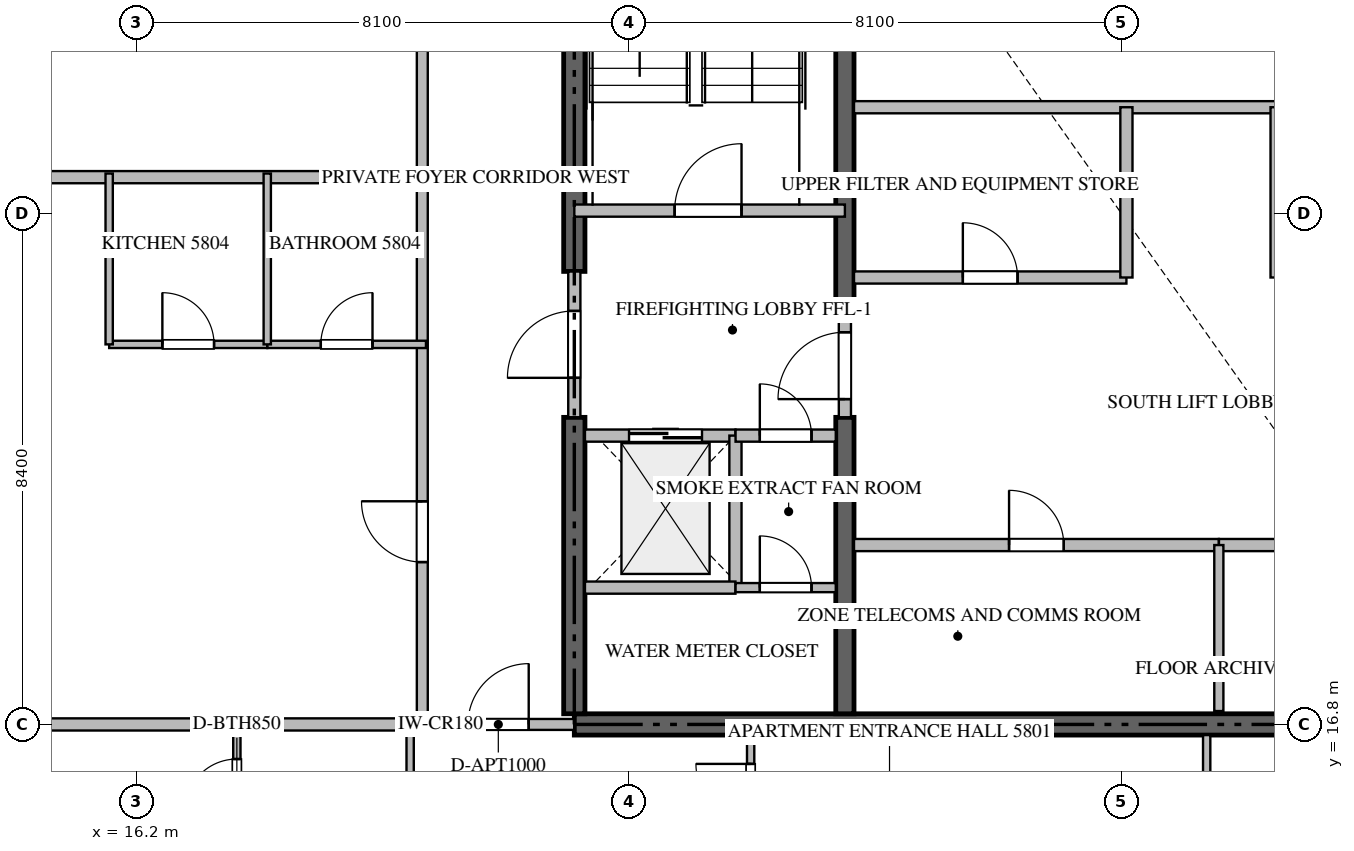
"""IFC4 building model, lengths in metres.
Left out: names, types, materials, properties, quantities, classifications, styles, units other than length and angle.
Written with IfcOpenShell. Run it as: python <this file> out.ifc"""

import sys

from ifc_helpers import new_model, si_unit, direction, frame, frame_2d, origin, place, context, subcontext, project, spatial, rectangle, extrude, source, transform, mapped, element, fill, save


model = new_model("IFC4")
c1 = context("Model", 3, precision=1e-05, world=origin(), true_north=direction((0.0, 1.0)))
c2 = subcontext(c1, "Body", "Model", "MODEL_VIEW")
j1 = project(units=[si_unit("LENGTHUNIT", "METRE"), si_unit("PLANEANGLEUNIT", "RADIAN")], contexts=[c1])
p1 = place(None, origin())
s1 = spatial("IfcSite", under=j1, at=p1, CompositionType="ELEMENT")
p2 = place(p1, origin())
s2 = spatial("IfcBuilding", under=s1, at=p2, CompositionType="ELEMENT")
p3 = place(p2, frame((0.0, 0.0, 233.55)))
s3 = spatial("IfcBuildingStorey", under=s2, at=p3, CompositionType="ELEMENT", Elevation=233.55)
p4 = place(p3, frame((23.4, 16.8, -0.26), z_axis=(0.0, 0.0, 1.0), x_axis=(1.0, 0.0, 0.0)))
e1 = element("IfcWall", 1, at=p4, inside=s3, PredefinedType="SHEAR", context=c2, shape_type="SweptSolid", body=[
    extrude(rectangle(XDim=18.0, YDim=0.35, at=frame_2d((9.0, 0.0))), origin(), (0.0, 0.0, 1.0), 3.848),
])
p5 = place(p3, frame((23.4, 16.975, -0.26), z_axis=(0.0, 0.0, 1.0), x_axis=(0.0, 1.0, 0.0)))
e2 = element("IfcWall", 2, at=p5, inside=s3, PredefinedType="SHEAR", context=c2, shape_type="SweptSolid", body=[
    extrude(rectangle(XDim=4.875, YDim=0.35, at=frame_2d((2.438, 0.0))), origin(), (0.0, 0.0, 1.0), 3.848),
])
p6 = place(p3, frame((23.4, 24.25, -0.26), z_axis=(0.0, 0.0, 1.0), x_axis=(0.0, 1.0, 0.0)))
e3 = element("IfcWall", 3, at=p6, inside=s3, PredefinedType="SHEAR", context=c2, shape_type="SweptSolid", body=[
    extrude(rectangle(XDim=9.175, YDim=0.35, at=frame_2d((4.587, 0.0))), origin(), (0.0, 0.0, 1.0), 3.848),
])
p7 = place(p3, frame((27.85, 16.975, -0.26), z_axis=(0.0, 0.0, 1.0), x_axis=(0.0, 1.0, 0.0)))
e4 = element("IfcWall", 4, at=p7, inside=s3, PredefinedType="SHEAR", context=c2, shape_type="SweptSolid", body=[
    extrude(rectangle(XDim=4.875, YDim=0.3, at=frame_2d((2.438, 0.0))), origin(), (0.0, 0.0, 1.0), 3.848),
])
p8 = place(p3, frame((27.85, 23.55, -0.26), z_axis=(0.0, 0.0, 1.0), x_axis=(0.0, 1.0, 0.0)))
e5 = element("IfcWall", 5, at=p8, inside=s3, PredefinedType="SHEAR", context=c2, shape_type="SweptSolid", body=[
    extrude(rectangle(XDim=9.875, YDim=0.3, at=frame_2d((4.938, 0.0))), origin(), (0.0, 0.0, 1.0), 3.848),
])
p9 = place(p3, frame((23.4, 25.25, 0.0), z_axis=(0.0, 0.0, 1.0), x_axis=(1.0, 0.0, 0.0)))
e6 = element("IfcWall", 6, at=p9, inside=s3, PredefinedType="STANDARD", context=c2, shape_type="SweptSolid", body=[
    extrude(rectangle(XDim=4.45, YDim=0.2, at=frame_2d((2.225, 0.0))), origin(), (0.0, 0.0, 1.0), 3.59),
])
p10 = place(p9, frame((1.65, 0.0, 0.0)))
e7 = element("IfcOpeningElement", 7, at=p10, cuts=e6, PredefinedType="OPENING", context=c2, shape_type="SweptSolid", body=[
    extrude(rectangle(XDim=1.1, YDim=2.15, at=frame_2d((0.55, 1.075))), frame((0.0, 0.11, 0.0), z_axis=(0.0, -1.0, 0.0), x_axis=(1.0, 0.0, 0.0)), (0.0, 0.0, 1.0), 0.22),
])
p11 = place(p3, frame((23.575, 21.55, 0.0), z_axis=(0.0, 0.0, 1.0), x_axis=(1.0, 0.0, 0.0)))
e8 = element("IfcWall", 8, at=p11, inside=s3, PredefinedType="STANDARD", context=c2, shape_type="SweptSolid", body=[
    extrude(rectangle(XDim=2.475, YDim=0.2, at=frame_2d((1.238, 0.0))), origin(), (0.0, 0.0, 1.0), 3.59),
])
p12 = place(p11, frame((0.725, 0.0, 0.0)))
e9 = element("IfcOpeningElement", 9, at=p12, cuts=e8, PredefinedType="OPENING", context=c2, shape_type="SweptSolid", body=[
    extrude(rectangle(XDim=1.2, YDim=2.2, at=frame_2d((0.6, 1.1))), frame((0.0, 0.11, 0.0), z_axis=(0.0, -1.0, 0.0), x_axis=(1.0, 0.0, 0.0)), (0.0, 0.0, 1.0), 0.22),
])
p13 = place(p3, frame((26.05, 19.05, 0.0), z_axis=(0.0, 0.0, 1.0), x_axis=(0.0, 1.0, 0.0)))
e10 = element("IfcWall", 10, at=p13, inside=s3, PredefinedType="STANDARD", context=c2, shape_type="SweptSolid", body=[
    extrude(rectangle(XDim=2.5, YDim=0.2, at=frame_2d((1.25, 0.0))), origin(), (0.0, 0.0, 1.0), 3.59),
])
p14 = place(p3, frame((23.575, 19.05, 0.0), z_axis=(0.0, 0.0, 1.0), x_axis=(1.0, 0.0, 0.0)))
e11 = element("IfcWall", 11, at=p14, inside=s3, PredefinedType="STANDARD", context=c2, shape_type="SweptSolid", body=[
    extrude(rectangle(XDim=2.475, YDim=0.2, at=frame_2d((1.238, 0.0))), origin(), (0.0, 0.0, 1.0), 3.59),
])
p15 = place(p3, frame((26.052, 21.55, 0.0), z_axis=(0.0, 0.0, 1.0), x_axis=(1.0, 0.0, 0.0)))
e12 = element("IfcWall", 12, at=p15, inside=s3, PredefinedType="STANDARD", context=c2, shape_type="SweptSolid", body=[
    extrude(rectangle(XDim=1.648, YDim=0.2, at=frame_2d((0.824, 0.0))), origin(), (0.0, 0.0, 1.0), 3.59),
])
p16 = place(p15, frame((0.399, 0.0, 0.0)))
e13 = element("IfcOpeningElement", 13, at=p16, cuts=e12, PredefinedType="OPENING", context=c2, shape_type="SweptSolid", body=[
    extrude(rectangle(XDim=0.85, YDim=2.1, at=frame_2d((0.425, 1.05))), frame((0.0, 0.11, 0.0), z_axis=(0.0, -1.0, 0.0), x_axis=(1.0, 0.0, 0.0)), (0.0, 0.0, 1.0), 0.22),
])
p17 = place(p3, frame((23.4, 21.852, 0.0), z_axis=(0.0, 0.0, 1.0), x_axis=(0.0, 1.0, 0.0)))
e14 = element("IfcWall", 14, at=p17, inside=s3, PredefinedType="STANDARD", context=c2, shape_type="SweptSolid", body=[
    extrude(rectangle(XDim=2.396, YDim=0.2, at=frame_2d((1.198, 0.0))), origin(), (0.0, 0.0, 1.0), 3.59),
])
p18 = place(p17, frame((0.648, 0.0, 0.0)))
e15 = element("IfcOpeningElement", 15, at=p18, cuts=e14, PredefinedType="OPENING", context=c2, shape_type="SweptSolid", body=[
    extrude(rectangle(XDim=1.1, YDim=2.15, at=frame_2d((0.55, 1.075))), frame((0.0, 0.11, 0.0), z_axis=(0.0, -1.0, 0.0), x_axis=(1.0, 0.0, 0.0)), (0.0, 0.0, 1.0), 0.22),
])
p19 = place(p3, frame((27.85, 21.852, 0.0), z_axis=(0.0, 0.0, 1.0), x_axis=(0.0, 1.0, 0.0)))
e16 = element("IfcWall", 16, at=p19, inside=s3, PredefinedType="STANDARD", context=c2, shape_type="SweptSolid", body=[
    extrude(rectangle(XDim=1.696, YDim=0.2, at=frame_2d((0.848, 0.0))), origin(), (0.0, 0.0, 1.0), 3.59),
])
p20 = place(p19, frame((0.298, 0.0, 0.0)))
e17 = element("IfcOpeningElement", 17, at=p20, cuts=e16, PredefinedType="OPENING", context=c2, shape_type="SweptSolid", body=[
    extrude(rectangle(XDim=1.1, YDim=2.15, at=frame_2d((0.55, 1.075))), frame((0.0, 0.11, 0.0), z_axis=(0.0, -1.0, 0.0), x_axis=(1.0, 0.0, 0.0)), (0.0, 0.0, 1.0), 0.22),
])
p21 = place(p3, frame((26.052, 19.05, 0.0), z_axis=(0.0, 0.0, 1.0), x_axis=(1.0, 0.0, 0.0)))
e18 = element("IfcWall", 18, at=p21, inside=s3, PredefinedType="PARTITIONING", context=c2, shape_type="SweptSolid", body=[
    extrude(rectangle(XDim=1.648, YDim=0.15, at=frame_2d((0.824, 0.0))), origin(), (0.0, 0.0, 1.0), 3.59),
])
p22 = place(p21, frame((0.399, 0.0, 0.0)))
e19 = element("IfcOpeningElement", 19, at=p22, cuts=e18, PredefinedType="OPENING", context=c2, shape_type="SweptSolid", body=[
    extrude(rectangle(XDim=0.85, YDim=2.1, at=frame_2d((0.425, 1.05))), frame((0.0, 0.085, 0.0), z_axis=(0.0, -1.0, 0.0), x_axis=(1.0, 0.0, 0.0)), (0.0, 0.0, 1.0), 0.17),
])
p23 = place(p3, frame((28.0, 19.75, 0.0), z_axis=(0.0, 0.0, 1.0), x_axis=(1.0, 0.0, 0.0)))
e20 = element("IfcWall", 20, at=p23, inside=s3, PredefinedType="STANDARD", context=c2, shape_type="SweptSolid", body=[
    extrude(rectangle(XDim=6.0, YDim=0.2, at=frame_2d((3.0, 0.0))), origin(), (0.0, 0.0, 1.0), 3.59),
])
p24 = place(p23, frame((2.55, 0.0, 0.0)))
e21 = element("IfcOpeningElement", 21, at=p24, cuts=e20, PredefinedType="OPENING", context=c2, shape_type="SweptSolid", body=[
    extrude(rectangle(XDim=0.9, YDim=2.1, at=frame_2d((0.45, 1.05))), frame((0.0, 0.11, 0.0), z_axis=(0.0, -1.0, 0.0), x_axis=(1.0, 0.0, 0.0)), (0.0, 0.0, 1.0), 0.22),
])
p25 = place(p3, frame((34.002, 19.75, 0.0), z_axis=(0.0, 0.0, 1.0), x_axis=(1.0, 0.0, 0.0)))
e22 = element("IfcWall", 22, at=p25, inside=s3, PredefinedType="STANDARD", context=c2, shape_type="SweptSolid", body=[
    extrude(rectangle(XDim=2.798, YDim=0.2, at=frame_2d((1.399, 0.0))), origin(), (0.0, 0.0, 1.0), 3.59),
])
p26 = place(p25, frame((0.974, 0.0, 0.0)))
e23 = element("IfcOpeningElement", 23, at=p26, cuts=e22, PredefinedType="OPENING", context=c2, shape_type="SweptSolid", body=[
    extrude(rectangle(XDim=0.85, YDim=2.1, at=frame_2d((0.425, 1.05))), frame((0.0, 0.11, 0.0), z_axis=(0.0, -1.0, 0.0), x_axis=(1.0, 0.0, 0.0)), (0.0, 0.0, 1.0), 0.22),
])
p27 = place(p3, frame((34.0, 17.02, 0.0), z_axis=(0.0, 0.0, 1.0), x_axis=(0.0, 1.0, 0.0)))
e24 = element("IfcWall", 24, at=p27, inside=s3, PredefinedType="PARTITIONING", context=c2, shape_type="SweptSolid", body=[
    extrude(rectangle(XDim=2.73, YDim=0.15, at=frame_2d((1.365, 0.0))), origin(), (0.0, 0.0, 1.0), 3.59),
])
p28 = place(p3, frame((28.0, 26.95, 0.0), z_axis=(0.0, 0.0, 1.0), x_axis=(1.0, 0.0, 0.0)))
e25 = element("IfcWall", 25, at=p28, inside=s3, PredefinedType="STANDARD", context=c2, shape_type="SweptSolid", body=[
    extrude(rectangle(XDim=6.95, YDim=0.2, at=frame_2d((3.475, 0.0))), origin(), (0.0, 0.0, 1.0), 3.59),
])
p29 = place(p3, frame((34.95, 24.15, 0.0), z_axis=(0.0, 0.0, 1.0), x_axis=(0.0, 1.0, 0.0)))
e26 = element("IfcWall", 26, at=p29, inside=s3, PredefinedType="STANDARD", context=c2, shape_type="SweptSolid", body=[
    extrude(rectangle(XDim=2.8, YDim=0.2, at=frame_2d((1.4, 0.0))), origin(), (0.0, 0.0, 1.0), 3.59),
])
p30 = place(p3, frame((28.0, 24.15, 0.0), z_axis=(0.0, 0.0, 1.0), x_axis=(1.0, 0.0, 0.0)))
e27 = element("IfcWall", 27, at=p30, inside=s3, PredefinedType="STANDARD", context=c2, shape_type="SweptSolid", body=[
    extrude(rectangle(XDim=4.48, YDim=0.2, at=frame_2d((2.24, 0.0))), origin(), (0.0, 0.0, 1.0), 3.59),
])
p31 = place(p30, frame((1.79, 0.0, 0.0)))
e28 = element("IfcOpeningElement", 28, at=p31, cuts=e27, PredefinedType="OPENING", context=c2, shape_type="SweptSolid", body=[
    extrude(rectangle(XDim=0.9, YDim=2.1, at=frame_2d((0.45, 1.05))), frame((0.0, 0.11, 0.0), z_axis=(0.0, -1.0, 0.0), x_axis=(1.0, 0.0, 0.0)), (0.0, 0.0, 1.0), 0.22),
])
p32 = place(p3, frame((32.48, 24.15, 0.0), z_axis=(0.0, 0.0, 1.0), x_axis=(0.0, 1.0, 0.0)))
e29 = element("IfcWall", 29, at=p32, inside=s3, PredefinedType="STANDARD", context=c2, shape_type="SweptSolid", body=[
    extrude(rectangle(XDim=2.8, YDim=0.2, at=frame_2d((1.4, 0.0))), origin(), (0.0, 0.0, 1.0), 3.59),
])
p33 = place(p3, frame((7.482, 25.8, 0.0), z_axis=(0.0, 0.0, 1.0), x_axis=(1.0, 0.0, 0.0)))
e30 = element("IfcWall", 30, at=p33, inside=s3, PredefinedType="PARTITIONING", context=c2, shape_type="SweptSolid", body=[
    extrude(rectangle(XDim=13.538, YDim=0.2, at=frame_2d((6.769, 0.0))), origin(), (0.0, 0.0, 1.0), 3.59),
])
p34 = place(p3, frame((7.482, 16.8, 0.0), z_axis=(0.0, 0.0, 1.0), x_axis=(1.0, 0.0, 0.0)))
e31 = element("IfcWall", 31, at=p34, inside=s3, PredefinedType="PARTITIONING", context=c2, shape_type="SweptSolid", body=[
    extrude(rectangle(XDim=13.418, YDim=0.2, at=frame_2d((6.709, 0.0))), origin(), (0.0, 0.0, 1.0), 3.59),
])
p35 = place(p3, frame((20.902, 16.8, 0.0), z_axis=(0.0, 0.0, 1.0), x_axis=(1.0, 0.0, 0.0)))
e32 = element("IfcWall", 32, at=p35, inside=s3, PredefinedType="PARTITIONING", context=c2, shape_type="SweptSolid", body=[
    extrude(rectangle(XDim=2.496, YDim=0.18, at=frame_2d((1.248, 0.0))), origin(), (0.0, 0.0, 1.0), 3.59),
])
p36 = place(p35, frame((0.748, 0.0, 0.0)))
e33 = element("IfcOpeningElement", 33, at=p36, cuts=e32, PredefinedType="OPENING", context=c2, shape_type="SweptSolid", body=[
    extrude(rectangle(XDim=1.0, YDim=2.15, at=frame_2d((0.5, 1.075))), frame((0.0, 0.1, 0.0), z_axis=(0.0, -1.0, 0.0), x_axis=(1.0, 0.0, 0.0)), (0.0, 0.0, 1.0), 0.2),
])
p37 = place(p3, frame((20.9, 16.8, 0.0), z_axis=(0.0, 0.0, 1.0), x_axis=(0.0, 1.0, 0.0)))
e34 = element("IfcWall", 34, at=p37, inside=s3, PredefinedType="PARTITIONING", context=c2, shape_type="SweptSolid", body=[
    extrude(rectangle(XDim=16.8, YDim=0.18, at=frame_2d((8.4, 0.0))), origin(), (0.0, 0.0, 1.0), 3.59),
])
p38 = place(p37, frame((2.67, 0.0, 0.0)))
e35 = element("IfcOpeningElement", 35, at=p38, cuts=e34, PredefinedType="OPENING", context=c2, shape_type="SweptSolid", body=[
    extrude(rectangle(XDim=1.0, YDim=2.15, at=frame_2d((0.5, 1.075))), frame((0.0, 0.1, 0.0), z_axis=(0.0, -1.0, 0.0), x_axis=(1.0, 0.0, 0.0)), (0.0, 0.0, 1.0), 0.2),
])
p39 = place(p37, frame((11.107, 0.0, 0.0)))
e36 = element("IfcOpeningElement", 36, at=p39, cuts=e34, PredefinedType="OPENING", context=c2, shape_type="SweptSolid", body=[
    extrude(rectangle(XDim=1.0, YDim=2.15, at=frame_2d((0.5, 1.075))), frame((0.0, 0.1, 0.0), z_axis=(0.0, -1.0, 0.0), x_axis=(1.0, 0.0, 0.0)), (0.0, 0.0, 1.0), 0.2),
])
p40 = place(p3, frame((20.7, 14.05, 0.0), z_axis=(0.0, 0.0, 1.0), x_axis=(0.0, 1.0, 0.0)))
e37 = element("IfcWall", 37, at=p40, inside=s3, PredefinedType="PARTITIONING", context=c2, shape_type="SweptSolid", body=[
    extrude(rectangle(XDim=2.81, YDim=0.12, at=frame_2d((1.405, 0.0))), origin(), (0.0, 0.0, 1.0), 3.59),
])
p41 = place(p3, frame((17.85, 14.752, 0.0), z_axis=(0.0, 0.0, 1.0), x_axis=(0.0, 1.0, 0.0)))
e38 = element("IfcWall", 38, at=p41, inside=s3, PredefinedType="PARTITIONING", context=c2, shape_type="SweptSolid", body=[
    extrude(rectangle(XDim=2.108, YDim=0.12, at=frame_2d((1.054, 0.0))), origin(), (0.0, 0.0, 1.0), 3.59),
])
p42 = place(p41, frame((0.629, 0.0, 0.0)))
e39 = element("IfcOpeningElement", 39, at=p42, cuts=e38, PredefinedType="OPENING", context=c2, shape_type="SweptSolid", body=[
    extrude(rectangle(XDim=0.85, YDim=2.1, at=frame_2d((0.425, 1.05))), frame((0.0, 0.07, 0.0), z_axis=(0.0, -1.0, 0.0), x_axis=(1.0, 0.0, 0.0)), (0.0, 0.0, 1.0), 0.14),
])
p43 = place(p3, frame((26.3, 14.65, 0.0), z_axis=(0.0, 0.0, 1.0), x_axis=(0.0, 1.0, 0.0)))
e40 = element("IfcWall", 40, at=p43, inside=s3, PredefinedType="PARTITIONING", context=c2, shape_type="SweptSolid", body=[
    extrude(rectangle(XDim=1.975, YDim=0.12, at=frame_2d((0.988, 0.0))), origin(), (0.0, 0.0, 1.0), 3.59),
])
p44 = place(p43, frame((0.601, 0.0, 0.0)))
e41 = element("IfcOpeningElement", 41, at=p44, cuts=e40, PredefinedType="OPENING", context=c2, shape_type="SweptSolid", body=[
    extrude(rectangle(XDim=0.9, YDim=2.1, at=frame_2d((0.45, 1.05))), frame((0.0, 0.07, 0.0), z_axis=(0.0, -1.0, 0.0), x_axis=(1.0, 0.0, 0.0)), (0.0, 0.0, 1.0), 0.14),
])
p45 = place(p3, frame((33.8, 14.652, 0.0), z_axis=(0.0, 0.0, 1.0), x_axis=(0.0, 1.0, 0.0)))
e42 = element("IfcWall", 42, at=p45, inside=s3, PredefinedType="PARTITIONING", context=c2, shape_type="SweptSolid", body=[
    extrude(rectangle(XDim=1.973, YDim=0.12, at=frame_2d((0.986, 0.0))), origin(), (0.0, 0.0, 1.0), 3.59),
])
p46 = place(p3, frame((15.75, 23.05, 0.0), z_axis=(0.0, 0.0, 1.0), x_axis=(1.0, 0.0, 0.0)))
e43 = element("IfcWall", 43, at=p46, inside=s3, PredefinedType="PARTITIONING", context=c2, shape_type="SweptSolid", body=[
    extrude(rectangle(XDim=2.6, YDim=0.12, at=frame_2d((1.3, 0.0))), origin(), (0.0, 0.0, 1.0), 3.59),
])
p47 = place(p46, frame((0.875, 0.0, 0.0)))
e44 = element("IfcOpeningElement", 44, at=p47, cuts=e43, PredefinedType="OPENING", context=c2, shape_type="SweptSolid", body=[
    extrude(rectangle(XDim=0.85, YDim=2.1, at=frame_2d((0.425, 1.05))), frame((0.0, 0.07, 0.0), z_axis=(0.0, -1.0, 0.0), x_axis=(1.0, 0.0, 0.0)), (0.0, 0.0, 1.0), 0.14),
])
p48 = place(p3, frame((18.352, 23.05, 0.0), z_axis=(0.0, 0.0, 1.0), x_axis=(1.0, 0.0, 0.0)))
e45 = element("IfcWall", 45, at=p48, inside=s3, PredefinedType="PARTITIONING", context=c2, shape_type="SweptSolid", body=[
    extrude(rectangle(XDim=2.608, YDim=0.12, at=frame_2d((1.304, 0.0))), origin(), (0.0, 0.0, 1.0), 3.59),
])
p49 = place(p48, frame((0.879, 0.0, 0.0)))
e46 = element("IfcOpeningElement", 46, at=p49, cuts=e45, PredefinedType="OPENING", context=c2, shape_type="SweptSolid", body=[
    extrude(rectangle(XDim=0.85, YDim=2.1, at=frame_2d((0.425, 1.05))), frame((0.0, 0.07, 0.0), z_axis=(0.0, -1.0, 0.0), x_axis=(1.0, 0.0, 0.0)), (0.0, 0.0, 1.0), 0.14),
])
for number, where, z_axis, x_axis in (
    (47, (18.35, 23.05, 0.0), (0.0, 0.0, 1.0), (0.0, 1.0, 0.0)),
    (48, (15.75, 23.05, 0.0), (0.0, 0.0, 1.0), (0.0, 1.0, 0.0)),
):
    element("IfcWall", number, at=place(p3, frame(where, z_axis=z_axis, x_axis=x_axis)), inside=s3, PredefinedType="PARTITIONING", context=c2, shape_type="SweptSolid", body=[
        extrude(rectangle(XDim=2.81, YDim=0.12, at=frame_2d((1.405, 0.0))), origin(), (0.0, 0.0, 1.0), 3.59),
    ])
m1 = source(origin(), c2, "Body", "SweptSolid", [
    extrude(rectangle(XDim=1.1, YDim=2.15, at=frame_2d((0.55, 1.075))), frame((0.0, 0.025, 0.0), z_axis=(0.0, -1.0, 0.0), x_axis=(1.0, 0.0, 0.0)), (0.0, 0.0, 1.0), 0.05),
])
p50 = place(p10, origin())
e49 = element("IfcDoor", 49, at=p50, inside=s3, OperationType="SINGLE_SWING_RIGHT", PredefinedType="DOOR", context=c2, shape_type="MappedRepresentation", body=[
    mapped(m1, transform((0.0, 0.0, 0.0), scale=1.0)),
])
fill(e7, e49)
m2 = source(origin(), c2, "Body", "SweptSolid", [
    extrude(rectangle(XDim=1.2, YDim=2.2, at=frame_2d((0.6, 1.1))), frame((0.0, 0.025, 0.0), z_axis=(0.0, -1.0, 0.0), x_axis=(1.0, 0.0, 0.0)), (0.0, 0.0, 1.0), 0.05),
])
p51 = place(p12, origin())
e50 = element("IfcDoor", 50, at=p51, inside=s3, OperationType="DOUBLE_DOOR_SLIDING", PredefinedType="DOOR", context=c2, shape_type="MappedRepresentation", body=[
    mapped(m2, transform((0.0, 0.0, 0.0), scale=1.0)),
])
fill(e9, e50)
m3 = source(origin(), c2, "Body", "SweptSolid", [
    extrude(rectangle(XDim=0.85, YDim=2.1, at=frame_2d((0.425, 1.05))), frame((0.0, 0.025, 0.0), z_axis=(0.0, -1.0, 0.0), x_axis=(1.0, 0.0, 0.0)), (0.0, 0.0, 1.0), 0.05),
])
p52 = place(p16, origin())
e51 = element("IfcDoor", 51, at=p52, inside=s3, OperationType="SINGLE_SWING_LEFT", PredefinedType="DOOR", context=c2, shape_type="MappedRepresentation", body=[
    mapped(m3, transform((0.0, 0.0, 0.0), scale=1.0)),
])
fill(e13, e51)
p53 = place(p18, origin())
e52 = element("IfcDoor", 52, at=p53, inside=s3, OperationType="SINGLE_SWING_LEFT", PredefinedType="DOOR", context=c2, shape_type="MappedRepresentation", body=[
    mapped(m1, transform((0.0, 0.0, 0.0), scale=1.0)),
])
fill(e15, e52)
p54 = place(p20, origin())
e53 = element("IfcDoor", 53, at=p54, inside=s3, OperationType="SINGLE_SWING_LEFT", PredefinedType="DOOR", context=c2, shape_type="MappedRepresentation", body=[
    mapped(m1, transform((0.0, 0.0, 0.0), scale=1.0)),
])
fill(e17, e53)
p55 = place(p22, origin())
e54 = element("IfcDoor", 54, at=p55, inside=s3, OperationType="SINGLE_SWING_LEFT", PredefinedType="DOOR", context=c2, shape_type="MappedRepresentation", body=[
    mapped(m3, transform((0.0, 0.0, 0.0), scale=1.0)),
])
fill(e19, e54)
m4 = source(origin(), c2, "Body", "SweptSolid", [
    extrude(rectangle(XDim=0.9, YDim=2.1, at=frame_2d((0.45, 1.05))), frame((0.0, 0.025, 0.0), z_axis=(0.0, -1.0, 0.0), x_axis=(1.0, 0.0, 0.0)), (0.0, 0.0, 1.0), 0.05),
])
p56 = place(p24, origin())
e55 = element("IfcDoor", 55, at=p56, inside=s3, OperationType="SINGLE_SWING_LEFT", PredefinedType="DOOR", context=c2, shape_type="MappedRepresentation", body=[
    mapped(m4, transform((0.0, 0.0, 0.0), scale=1.0)),
])
fill(e21, e55)
p57 = place(p31, origin())
e56 = element("IfcDoor", 56, at=p57, inside=s3, OperationType="SINGLE_SWING_LEFT", PredefinedType="DOOR", context=c2, shape_type="MappedRepresentation", body=[
    mapped(m4, transform((0.0, 0.0, 0.0), scale=1.0)),
])
fill(e28, e56)
m5 = source(origin(), c2, "Body", "SweptSolid", [
    extrude(rectangle(XDim=1.0, YDim=2.15, at=frame_2d((0.5, 1.075))), frame((0.0, 0.025, 0.0), z_axis=(0.0, -1.0, 0.0), x_axis=(1.0, 0.0, 0.0)), (0.0, 0.0, 1.0), 0.05),
])
p58 = place(p36, origin())
e57 = element("IfcDoor", 57, at=p58, inside=s3, OperationType="SINGLE_SWING_RIGHT", PredefinedType="DOOR", context=c2, shape_type="MappedRepresentation", body=[
    mapped(m5, transform((0.0, 0.0, 0.0), scale=1.0)),
])
fill(e33, e57)
p59 = place(p38, origin())
e58 = element("IfcDoor", 58, at=p59, inside=s3, OperationType="SINGLE_SWING_RIGHT", PredefinedType="DOOR", context=c2, shape_type="MappedRepresentation", body=[
    mapped(m5, transform((0.0, 0.0, 0.0), scale=1.0)),
])
fill(e35, e58)
p60 = place(p42, origin())
e59 = element("IfcDoor", 59, at=p60, inside=s3, OperationType="SINGLE_SWING_LEFT", PredefinedType="DOOR", context=c2, shape_type="MappedRepresentation", body=[
    mapped(m3, transform((0.0, 0.0, 0.0), scale=1.0)),
])
fill(e39, e59)
p61 = place(p44, origin())
e60 = element("IfcDoor", 60, at=p61, inside=s3, OperationType="SINGLE_SWING_RIGHT", PredefinedType="DOOR", context=c2, shape_type="MappedRepresentation", body=[
    mapped(m4, transform((0.0, 0.0, 0.0), scale=1.0)),
])
fill(e41, e60)
p62 = place(p47, origin())
e61 = element("IfcDoor", 61, at=p62, inside=s3, OperationType="SINGLE_SWING_LEFT", PredefinedType="DOOR", context=c2, shape_type="MappedRepresentation", body=[
    mapped(m3, transform((0.0, 0.0, 0.0), scale=1.0)),
])
fill(e44, e61)
p63 = place(p49, origin())
e62 = element("IfcDoor", 62, at=p63, inside=s3, OperationType="SINGLE_SWING_RIGHT", PredefinedType="DOOR", context=c2, shape_type="MappedRepresentation", body=[
    mapped(m3, transform((0.0, 0.0, 0.0), scale=1.0)),
])
fill(e46, e62)
save(model, sys.argv[1])
